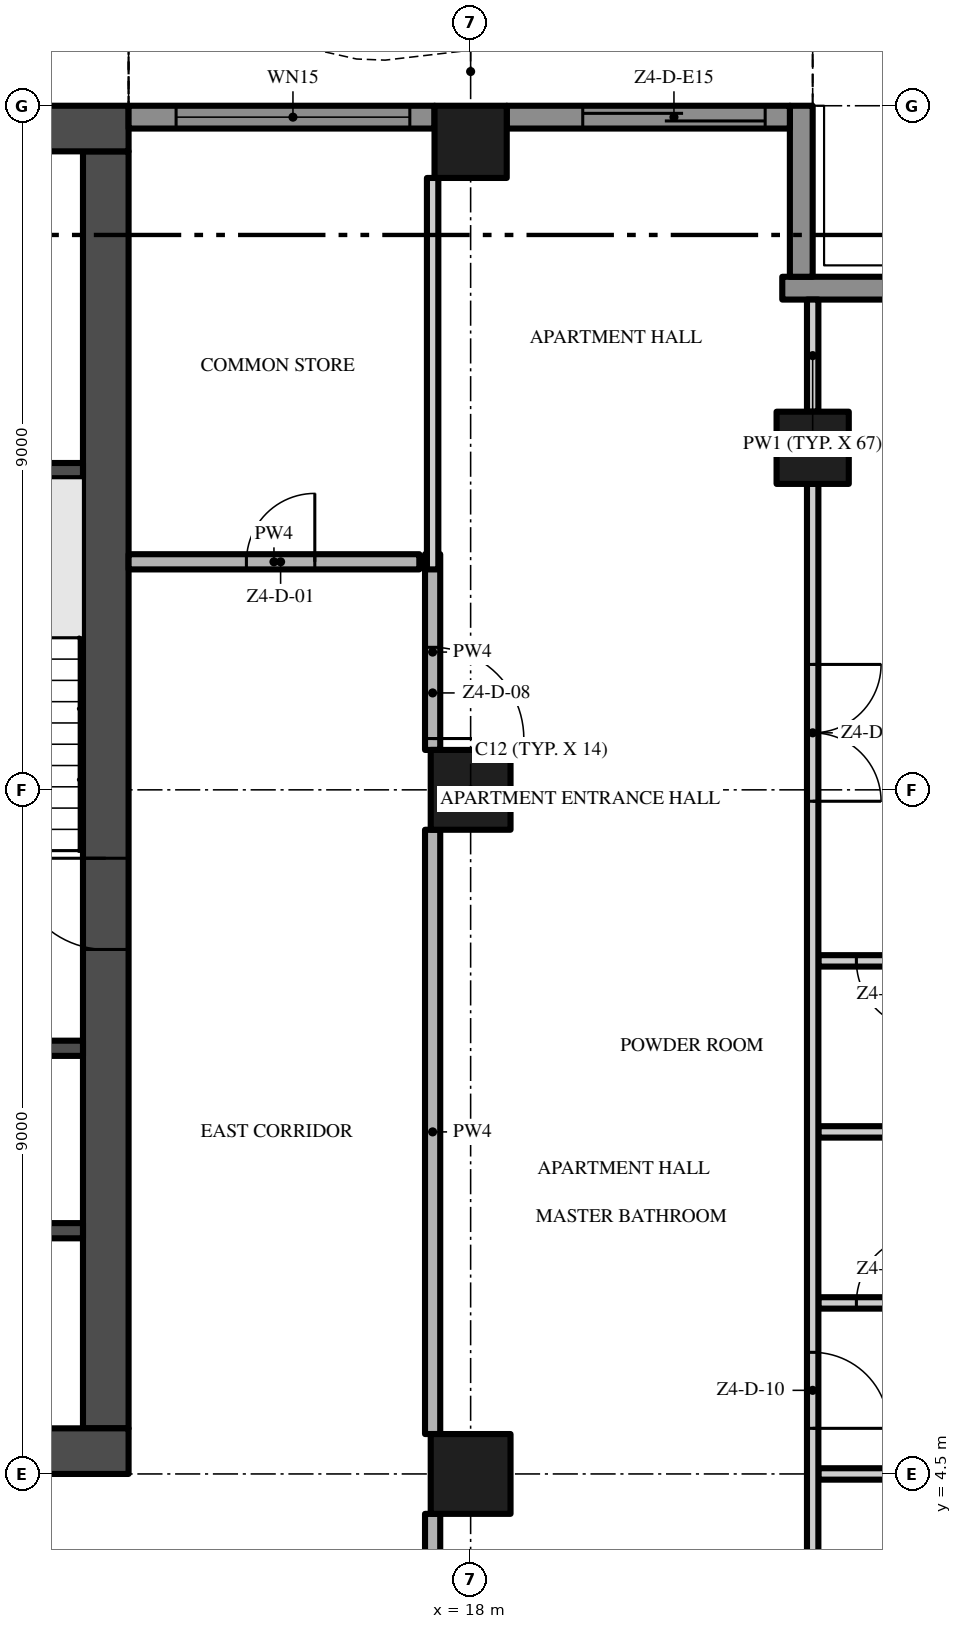
"""IFC4 building model, lengths in metres.
Left out: names, types, materials, properties, quantities, classifications, styles, units other than length and angle.
Written with IfcOpenShell. Run it as: python <this file> out.ifc"""

import sys

from ifc_helpers import new_model, si_unit, direction, frame, frame_2d, origin, origin_2d, place, context, subcontext, project, spatial, polyline, rectangle, outline, extrude, element, fill, save


model = new_model("IFC4")
c1 = context("Model", 3, precision=1e-05, world=origin(), true_north=direction((0.0, 1.0)))
c2 = subcontext(c1, "Body", "Model", "MODEL_VIEW")
j1 = project(units=[si_unit("LENGTHUNIT", "METRE"), si_unit("PLANEANGLEUNIT", "RADIAN")], contexts=[c1])
p1 = place(None, origin())
s1 = spatial("IfcSite", under=j1, at=p1, CompositionType="ELEMENT")
p2 = place(p1, origin())
s2 = spatial("IfcBuilding", under=s1, at=p2, CompositionType="ELEMENT")
p3 = place(p2, frame((0.0, 0.0, 222.4)))
s3 = spatial("IfcBuildingStorey", under=s2, at=p3, CompositionType="ELEMENT", Elevation=222.4)
p4 = place(p3, frame((-13.5, 4.8, -0.3), z_axis=(0.0, 0.0, 1.0), x_axis=(1.0, 0.0, 0.0)))
e1 = element("IfcWall", 1, at=p4, inside=s3, PredefinedType="SHEAR", context=c2, shape_type="SweptSolid", body=[
    extrude(rectangle(XDim=27.0, YDim=0.6, at=frame_2d((13.5, 0.0))), origin(), (0.0, 0.0, 1.0), 3.8),
])
p5 = place(p4, frame((12.0, 0.0, 0.3)))
e2 = element("IfcOpeningElement", 2, at=p5, cuts=e1, PredefinedType="OPENING", context=c2, shape_type="SweptSolid", body=[
    extrude(rectangle(XDim=3.0, YDim=2.4, at=frame_2d((1.5, 1.2))), frame((0.0, 0.31, 0.0), z_axis=(0.0, -1.0, 0.0), x_axis=(1.0, 0.0, 0.0)), (0.0, 0.0, 1.0), 0.62),
])
p6 = place(p4, frame((4.9, 0.0, 0.3)))
e3 = element("IfcOpeningElement", 3, at=p6, cuts=e1, PredefinedType="OPENING", context=c2, shape_type="SweptSolid", body=[
    extrude(rectangle(XDim=1.2, YDim=2.2, at=frame_2d((0.6, 1.1))), frame((0.0, 0.31, 0.0), z_axis=(0.0, -1.0, 0.0), x_axis=(1.0, 0.0, 0.0)), (0.0, 0.0, 1.0), 0.62),
])
p7 = place(p4, frame((20.75, 0.0, 0.3)))
e4 = element("IfcOpeningElement", 4, at=p7, cuts=e1, PredefinedType="OPENING", context=c2, shape_type="SweptSolid", body=[
    extrude(rectangle(XDim=1.5, YDim=2.2, at=frame_2d((0.75, 1.1))), frame((0.0, 0.31, 0.0), z_axis=(0.0, -1.0, 0.0), x_axis=(1.0, 0.0, 0.0)), (0.0, 0.0, 1.0), 0.62),
])
p8 = place(p4, frame((17.4, 0.0, 0.3)))
e5 = element("IfcOpeningElement", 5, at=p8, cuts=e1, PredefinedType="OPENING", context=c2, shape_type="SweptSolid", body=[
    extrude(rectangle(XDim=1.2, YDim=2.2, at=frame_2d((0.6, 1.1))), frame((0.0, 0.31, 0.0), z_axis=(0.0, -1.0, 0.0), x_axis=(1.0, 0.0, 0.0)), (0.0, 0.0, 1.0), 0.62),
])
p9 = place(p3, frame((13.2, 5.1, -0.3), z_axis=(0.0, 0.0, 1.0), x_axis=(0.0, 1.0, 0.0)))
e6 = element("IfcWall", 6, at=p9, inside=s3, PredefinedType="SHEAR", context=c2, shape_type="SweptSolid", body=[
    extrude(rectangle(XDim=16.8, YDim=0.6, at=frame_2d((8.4, 0.0))), origin(), (0.0, 0.0, 1.0), 3.8),
])
p10 = place(p9, frame((6.3, 0.0, 0.3)))
e7 = element("IfcOpeningElement", 7, at=p10, cuts=e6, PredefinedType="OPENING", context=c2, shape_type="SweptSolid", body=[
    extrude(rectangle(XDim=1.2, YDim=2.2, at=frame_2d((0.6, 1.1))), frame((0.0, 0.31, 0.0), z_axis=(0.0, -1.0, 0.0), x_axis=(1.0, 0.0, 0.0)), (0.0, 0.0, 1.0), 0.62),
])
p11 = place(p3, frame((13.5, 22.2, -0.3), z_axis=(0.0, 0.0, 1.0), x_axis=(-1.0, 0.0, 0.0)))
e8 = element("IfcWall", 8, at=p11, inside=s3, PredefinedType="SHEAR", context=c2, shape_type="SweptSolid", body=[
    extrude(rectangle(XDim=27.0, YDim=0.6, at=frame_2d((13.5, 0.0))), origin(), (0.0, 0.0, 1.0), 3.8),
])
p12 = place(p3, frame((18.0, 13.5, 0.0), z_axis=(0.0, 0.0, 1.0), x_axis=(1.0, 0.0, 0.0)))
e9 = element("IfcColumn", 9, at=p12, inside=s3, PredefinedType="COLUMN", context=c2, shape_type="SweptSolid", body=[
    extrude(rectangle(XDim=1.05, YDim=1.05, at=origin_2d()), origin(), (0.0, 0.0, 1.0), 3.5),
])
p13 = place(p3, frame((18.0, 22.025, 0.0), z_axis=(0.0, 0.0, 1.0), x_axis=(1.0, 0.0, 0.0)))
e10 = element("IfcColumn", 10, at=p13, inside=s3, PredefinedType="COLUMN", context=c2, shape_type="SweptSolid", body=[
    extrude(rectangle(XDim=0.95, YDim=0.95, at=origin_2d()), origin(), (0.0, 0.0, 1.0), 3.5),
])
p14 = place(p3, frame((18.0, 4.5, 0.0), z_axis=(0.0, 0.0, 1.0), x_axis=(1.0, 0.0, 0.0)))
e11 = element("IfcColumn", 11, at=p14, inside=s3, PredefinedType="COLUMN", context=c2, shape_type="SweptSolid", body=[
    extrude(rectangle(XDim=1.05, YDim=1.05, at=origin_2d()), origin(), (0.0, 0.0, 1.0), 3.5),
])
p15 = place(p3, frame((22.5, 18.0, 0.0), z_axis=(0.0, 0.0, 1.0), x_axis=(1.0, 0.0, 0.0)))
e12 = element("IfcColumn", 12, at=p15, inside=s3, PredefinedType="COLUMN", context=c2, shape_type="SweptSolid", body=[
    extrude(rectangle(XDim=0.95, YDim=0.95, at=origin_2d()), origin(), (0.0, 0.0, 1.0), 3.5),
])
p16 = place(p3, frame((22.1, 20.1, 0.0), z_axis=(0.0, 0.0, 1.0), x_axis=(1.0, 0.0, 0.0)))
e13 = element("IfcWall", 13, at=p16, inside=s3, PredefinedType="SOLIDWALL", context=c2, shape_type="SweptSolid", body=[
    extrude(rectangle(XDim=2.35, YDim=0.3, at=frame_2d((1.175, 0.0))), origin(), (0.0, 0.0, 1.0), 3.5),
])
p17 = place(p3, frame((22.35, 22.5, 0.0), z_axis=(0.0, 0.0, 1.0), x_axis=(0.0, -1.0, 0.0)))
e14 = element("IfcWall", 14, at=p17, inside=s3, PredefinedType="SOLIDWALL", context=c2, shape_type="SweptSolid", body=[
    extrude(rectangle(XDim=2.25, YDim=0.3, at=frame_2d((1.125, 0.0))), origin(), (0.0, 0.0, 1.0), 3.5),
])
p18 = place(p3, frame((18.475, 22.35, 0.0), z_axis=(0.0, 0.0, 1.0), x_axis=(1.0, 0.0, 0.0)))
e15 = element("IfcWall", 15, at=p18, inside=s3, PredefinedType="SOLIDWALL", context=c2, shape_type="SweptSolid", body=[
    extrude(rectangle(XDim=3.725, YDim=0.3, at=frame_2d((1.863, 0.0))), origin(), (0.0, 0.0, 1.0), 3.5),
])
p19 = place(p18, frame((1.0, 0.0, 0.0)))
e16 = element("IfcOpeningElement", 16, at=p19, cuts=e15, PredefinedType="OPENING", context=c2, shape_type="SweptSolid", body=[
    extrude(rectangle(XDim=2.4, YDim=2.4, at=frame_2d((1.2, 1.2))), frame((0.0, 0.16, 0.0), z_axis=(0.0, -1.0, 0.0), x_axis=(1.0, 0.0, 0.0)), (0.0, 0.0, 1.0), 0.32),
])
p20 = place(p3, frame((13.5, 22.35, 0.0), z_axis=(0.0, 0.0, 1.0), x_axis=(1.0, 0.0, 0.0)))
e17 = element("IfcWall", 17, at=p20, inside=s3, PredefinedType="SOLIDWALL", context=c2, shape_type="SweptSolid", body=[
    extrude(rectangle(XDim=4.025, YDim=0.3, at=frame_2d((2.013, 0.0))), origin(), (0.0, 0.0, 1.0), 3.5),
])
p21 = place(p20, frame((0.625, 0.0, 0.45)))
e18 = element("IfcOpeningElement", 18, at=p21, cuts=e17, PredefinedType="OPENING", context=c2, shape_type="SweptSolid", body=[
    extrude(rectangle(XDim=3.075, YDim=2.65, at=frame_2d((1.538, 1.325))), frame((0.0, 0.16, 0.0), z_axis=(0.0, -1.0, 0.0), x_axis=(1.0, 0.0, 0.0)), (0.0, 0.0, 1.0), 0.32),
])
p22 = place(p3, origin())
e19 = element("IfcWall", 19, at=p22, inside=s3, PredefinedType="USERDEFINED", context=c2, shape_type="SweptSolid", body=[
    extrude(outline(polyline([(22.5, 25.149), (21.0, 24.488), (19.5, 23.755), (18.0, 23.231), (16.875, 23.1), (16.5, 23.115), (15.0, 23.451), (13.5, 24.112), (13.399, 23.883), (14.921, 23.213), (16.467, 22.866), (16.885, 22.849), (18.056, 22.986), (19.596, 23.524), (21.105, 24.261), (22.601, 24.92), (22.5, 25.149)])), origin(), (0.0, 0.0, 1.0), 0.9),
])
for number, where, z_axis, x_axis in (
    (20, (9.65, 7.7, 0.0), (0.0, 0.0, 1.0), (1.0, 0.0, 0.0)),
    (21, (9.65, 10.1, 0.0), (0.0, 0.0, 1.0), (1.0, 0.0, 0.0)),
    (22, (9.65, 17.7, 0.0), (0.0, 0.0, 1.0), (1.0, 0.0, 0.0)),
):
    element("IfcWall", number, at=place(p3, frame(where, z_axis=z_axis, x_axis=x_axis)), inside=s3, PredefinedType="SHEAR", context=c2, shape_type="SweptSolid", body=[
        extrude(rectangle(XDim=3.25, YDim=0.2, at=frame_2d((1.625, 0.0))), origin(), (0.0, 0.0, 1.0), 3.5),
    ])
p23 = place(p3, frame((22.575, 4.5, 0.0), z_axis=(0.0, 0.0, 1.0), x_axis=(1.0, 0.0, 0.0)))
e23 = element("IfcWall", 23, at=p23, inside=s3, PredefinedType="PARTITIONING", context=c2, shape_type="SweptSolid", body=[
    extrude(rectangle(XDim=3.475, YDim=0.15, at=frame_2d((1.738, 0.0))), origin(), (0.0, 0.0, 1.0), 3.5),
])
p24 = place(p3, frame((22.575, 6.75, 0.0), z_axis=(0.0, 0.0, 1.0), x_axis=(1.0, 0.0, 0.0)))
e24 = element("IfcWall", 24, at=p24, inside=s3, PredefinedType="PARTITIONING", context=c2, shape_type="SweptSolid", body=[
    extrude(rectangle(XDim=1.875, YDim=0.15, at=frame_2d((0.938, 0.0))), origin(), (0.0, 0.0, 1.0), 3.5),
])
p25 = place(p24, frame((0.5, 0.0, 0.0)))
e25 = element("IfcOpeningElement", 25, at=p25, cuts=e24, PredefinedType="OPENING", context=c2, shape_type="SweptSolid", body=[
    extrude(rectangle(XDim=0.9, YDim=2.1, at=frame_2d((0.45, 1.05))), frame((0.0, 0.085, 0.0), z_axis=(0.0, -1.0, 0.0), x_axis=(1.0, 0.0, 0.0)), (0.0, 0.0, 1.0), 0.17),
])
p26 = place(p3, frame((22.575, 9.0, 0.0), z_axis=(0.0, 0.0, 1.0), x_axis=(1.0, 0.0, 0.0)))
e26 = element("IfcWall", 26, at=p26, inside=s3, PredefinedType="PARTITIONING", context=c2, shape_type="SweptSolid", body=[
    extrude(rectangle(XDim=1.875, YDim=0.15, at=frame_2d((0.938, 0.0))), origin(), (0.0, 0.0, 1.0), 3.5),
])
p27 = place(p3, frame((24.45, 11.25, 0.0), z_axis=(0.0, 0.0, 1.0), x_axis=(-1.0, 0.0, 0.0)))
e27 = element("IfcWall", 27, at=p27, inside=s3, PredefinedType="PARTITIONING", context=c2, shape_type="SweptSolid", body=[
    extrude(rectangle(XDim=1.875, YDim=0.15, at=frame_2d((0.938, 0.0))), origin(), (0.0, 0.0, 1.0), 3.5),
])
p28 = place(p27, frame((0.475, 0.0, 0.0)))
e28 = element("IfcOpeningElement", 28, at=p28, cuts=e27, PredefinedType="OPENING", context=c2, shape_type="SweptSolid", body=[
    extrude(rectangle(XDim=0.9, YDim=2.1, at=frame_2d((0.45, 1.05))), frame((0.0, 0.085, 0.0), z_axis=(0.0, -1.0, 0.0), x_axis=(1.0, 0.0, 0.0)), (0.0, 0.0, 1.0), 0.17),
])
p29 = place(p3, frame((13.5, 16.5, 0.0), z_axis=(0.0, 0.0, 1.0), x_axis=(1.0, 0.0, 0.0)))
e29 = element("IfcWall", 29, at=p29, inside=s3, PredefinedType="PARTITIONING", context=c2, shape_type="SweptSolid", body=[
    extrude(rectangle(XDim=3.825, YDim=0.2, at=frame_2d((1.913, 0.0))), origin(), (0.0, 0.0, 1.0), 3.5),
])
p30 = place(p29, frame((1.55, 0.0, 0.0)))
e30 = element("IfcOpeningElement", 30, at=p30, cuts=e29, PredefinedType="OPENING", context=c2, shape_type="SweptSolid", body=[
    extrude(rectangle(XDim=0.9, YDim=2.1, at=frame_2d((0.45, 1.05))), frame((0.0, 0.11, 0.0), z_axis=(0.0, -1.0, 0.0), x_axis=(1.0, 0.0, 0.0)), (0.0, 0.0, 1.0), 0.22),
])
p31 = place(p3, frame((17.5, -0.2, 0.0), z_axis=(0.0, 0.0, 1.0), x_axis=(0.0, 1.0, 0.0)))
e31 = element("IfcWall", 31, at=p31, inside=s3, PredefinedType="PARTITIONING", context=c2, shape_type="SweptSolid", body=[
    extrude(rectangle(XDim=4.175, YDim=0.2, at=frame_2d((2.087, 0.0))), origin(), (0.0, 0.0, 1.0), 3.5),
])
p32 = place(p3, frame((17.5, 5.025, 0.0), z_axis=(0.0, 0.0, 1.0), x_axis=(0.0, 1.0, 0.0)))
e32 = element("IfcWall", 32, at=p32, inside=s3, PredefinedType="PARTITIONING", context=c2, shape_type="SweptSolid", body=[
    extrude(rectangle(XDim=7.95, YDim=0.2, at=frame_2d((3.975, 0.0))), origin(), (0.0, 0.0, 1.0), 3.5),
])
p33 = place(p3, frame((17.5, 16.6, 0.0), z_axis=(0.0, 0.0, 1.0), x_axis=(0.0, -1.0, 0.0)))
e33 = element("IfcWall", 33, at=p33, inside=s3, PredefinedType="PARTITIONING", context=c2, shape_type="SweptSolid", body=[
    extrude(rectangle(XDim=2.575, YDim=0.2, at=frame_2d((1.288, 0.0))), origin(), (0.0, 0.0, 1.0), 3.5),
])
p34 = place(p33, frame((1.225, 0.0, 0.0)))
e34 = element("IfcOpeningElement", 34, at=p34, cuts=e33, PredefinedType="OPENING", context=c2, shape_type="SweptSolid", body=[
    extrude(rectangle(XDim=1.2, YDim=2.4, at=frame_2d((0.6, 1.2))), frame((0.0, 0.11, 0.0), z_axis=(0.0, -1.0, 0.0), x_axis=(1.0, 0.0, 0.0)), (0.0, 0.0, 1.0), 0.22),
])
p35 = place(p3, frame((17.5, 16.4, 0.0), z_axis=(0.0, 0.0, 1.0), x_axis=(0.0, 1.0, 0.0)))
e35 = element("IfcWall", 35, at=p35, inside=s3, PredefinedType="PARTITIONING", context=c2, shape_type="SweptSolid", body=[
    extrude(rectangle(XDim=5.15, YDim=0.15, at=frame_2d((2.575, 0.0))), origin(), (0.0, 0.0, 1.0), 3.5),
])
p36 = place(p3, frame((22.5, 17.525, 0.0), z_axis=(0.0, 0.0, 1.0), x_axis=(0.0, -1.0, 0.0)))
e36 = element("IfcWall", 36, at=p36, inside=s3, PredefinedType="PARTITIONING", context=c2, shape_type="SweptSolid", body=[
    extrude(rectangle(XDim=17.425, YDim=0.15, at=frame_2d((8.713, 0.0))), origin(), (0.0, 0.0, 1.0), 3.5),
])
p37 = place(p36, frame((14.775, 0.0, 0.0)))
e37 = element("IfcOpeningElement", 37, at=p37, cuts=e36, PredefinedType="OPENING", context=c2, shape_type="SweptSolid", body=[
    extrude(rectangle(XDim=1.0, YDim=2.4, at=frame_2d((0.5, 1.2))), frame((0.0, 0.085, 0.0), z_axis=(0.0, -1.0, 0.0), x_axis=(1.0, 0.0, 0.0)), (0.0, 0.0, 1.0), 0.17),
])
p38 = place(p36, frame((11.425, 0.0, 0.0)))
e38 = element("IfcOpeningElement", 38, at=p38, cuts=e36, PredefinedType="OPENING", context=c2, shape_type="SweptSolid", body=[
    extrude(rectangle(XDim=1.0, YDim=2.4, at=frame_2d((0.5, 1.2))), frame((0.0, 0.085, 0.0), z_axis=(0.0, -1.0, 0.0), x_axis=(1.0, 0.0, 0.0)), (0.0, 0.0, 1.0), 0.17),
])
p39 = place(p36, frame((2.375, 0.0, 0.0)))
e39 = element("IfcOpeningElement", 39, at=p39, cuts=e36, PredefinedType="OPENING", context=c2, shape_type="SweptSolid", body=[
    extrude(rectangle(XDim=1.8, YDim=2.4, at=frame_2d((0.9, 1.2))), frame((0.0, 0.085, 0.0), z_axis=(0.0, -1.0, 0.0), x_axis=(1.0, 0.0, 0.0)), (0.0, 0.0, 1.0), 0.17),
])
p40 = place(p3, frame((22.5, 18.475, 0.0), z_axis=(0.0, 0.0, 1.0), x_axis=(0.0, 1.0, 0.0)))
e40 = element("IfcWall", 40, at=p40, inside=s3, PredefinedType="PARTITIONING", context=c2, shape_type="SweptSolid", body=[
    extrude(rectangle(XDim=1.475, YDim=0.15, at=frame_2d((0.738, 0.0))), origin(), (0.0, 0.0, 1.0), 3.5),
])
p41 = place(p19, origin())
e41 = element("IfcDoor", 41, at=p41, inside=s3, OperationType="SINGLE_SWING_LEFT", PredefinedType="DOOR", context=c2, shape_type="SweptSolid", body=[
    extrude(rectangle(XDim=2.4, YDim=2.4, at=frame_2d((1.2, 1.2))), frame((0.0, 0.025, 0.0), z_axis=(0.0, -1.0, 0.0), x_axis=(1.0, 0.0, 0.0)), (0.0, 0.0, 1.0), 0.05),
])
fill(e16, e41)
p42 = place(p21, origin())
e42 = element("IfcWindow", 42, at=p42, inside=s3, PartitioningType="SINGLE_PANEL", PredefinedType="WINDOW", context=c2, shape_type="SweptSolid", body=[
    extrude(rectangle(XDim=3.075, YDim=2.65, at=frame_2d((1.538, 1.325))), frame((0.0, 0.03, 0.0), z_axis=(0.0, -1.0, 0.0), x_axis=(1.0, 0.0, 0.0)), (0.0, 0.0, 1.0), 0.06),
])
fill(e18, e42)
p43 = place(p10, frame((1.2, 0.0, 0.0), z_axis=(0.0, 0.0, 1.0), x_axis=(-1.0, 0.0, 0.0)))
e43 = element("IfcDoor", 43, at=p43, inside=s3, OperationType="SINGLE_SWING_LEFT", PredefinedType="DOOR", context=c2, shape_type="SweptSolid", body=[
    extrude(rectangle(XDim=1.2, YDim=2.2, at=frame_2d((0.6, 1.1))), frame((0.0, 0.025, 0.0), z_axis=(0.0, -1.0, 0.0), x_axis=(1.0, 0.0, 0.0)), (0.0, 0.0, 1.0), 0.05),
])
fill(e7, e43)
p44 = place(p30, origin())
e44 = element("IfcDoor", 44, at=p44, inside=s3, OperationType="SINGLE_SWING_RIGHT", PredefinedType="DOOR", context=c2, shape_type="SweptSolid", body=[
    extrude(rectangle(XDim=0.9, YDim=2.1, at=frame_2d((0.45, 1.05))), frame((0.0, 0.025, 0.0), z_axis=(0.0, -1.0, 0.0), x_axis=(1.0, 0.0, 0.0)), (0.0, 0.0, 1.0), 0.05),
])
fill(e30, e44)
p45 = place(p34, origin())
e45 = element("IfcDoor", 45, at=p45, inside=s3, OperationType="SINGLE_SWING_RIGHT", PredefinedType="DOOR", context=c2, shape_type="SweptSolid", body=[
    extrude(rectangle(XDim=1.2, YDim=2.4, at=frame_2d((0.6, 1.2))), frame((0.0, 0.025, 0.0), z_axis=(0.0, -1.0, 0.0), x_axis=(1.0, 0.0, 0.0)), (0.0, 0.0, 1.0), 0.05),
])
fill(e34, e45)
p46 = place(p38, origin())
e46 = element("IfcDoor", 46, at=p46, inside=s3, OperationType="SINGLE_SWING_RIGHT", PredefinedType="DOOR", context=c2, shape_type="SweptSolid", body=[
    extrude(rectangle(XDim=1.0, YDim=2.4, at=frame_2d((0.5, 1.2))), frame((0.0, 0.025, 0.0), z_axis=(0.0, -1.0, 0.0), x_axis=(1.0, 0.0, 0.0)), (0.0, 0.0, 1.0), 0.05),
])
fill(e38, e46)
p47 = place(p25, origin())
e47 = element("IfcDoor", 47, at=p47, inside=s3, OperationType="SINGLE_SWING_RIGHT", PredefinedType="DOOR", context=c2, shape_type="SweptSolid", body=[
    extrude(rectangle(XDim=0.9, YDim=2.1, at=frame_2d((0.45, 1.05))), frame((0.0, 0.025, 0.0), z_axis=(0.0, -1.0, 0.0), x_axis=(1.0, 0.0, 0.0)), (0.0, 0.0, 1.0), 0.05),
])
fill(e25, e47)
p48 = place(p39, origin())
e48 = element("IfcDoor", 48, at=p48, inside=s3, OperationType="DOUBLE_DOOR_SINGLE_SWING", PredefinedType="DOOR", context=c2, shape_type="SweptSolid", body=[
    extrude(rectangle(XDim=1.8, YDim=2.4, at=frame_2d((0.9, 1.2))), frame((0.0, 0.025, 0.0), z_axis=(0.0, -1.0, 0.0), x_axis=(1.0, 0.0, 0.0)), (0.0, 0.0, 1.0), 0.05),
])
fill(e39, e48)
p49 = place(p28, origin())
e49 = element("IfcDoor", 49, at=p49, inside=s3, OperationType="SINGLE_SWING_LEFT", PredefinedType="DOOR", context=c2, shape_type="SweptSolid", body=[
    extrude(rectangle(XDim=0.9, YDim=2.1, at=frame_2d((0.45, 1.05))), frame((0.0, 0.025, 0.0), z_axis=(0.0, -1.0, 0.0), x_axis=(1.0, 0.0, 0.0)), (0.0, 0.0, 1.0), 0.05),
])
fill(e28, e49)
save(model, sys.argv[1])
